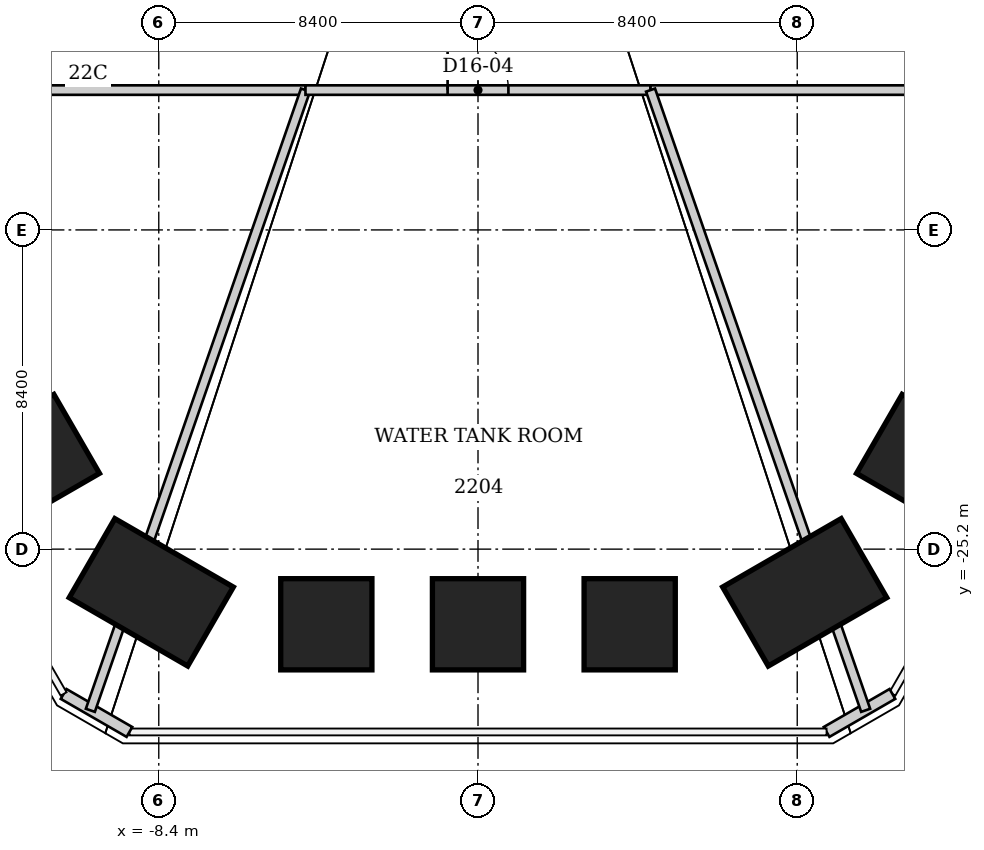
"""IFC4 building model, lengths in metres.
Left out: names, types, materials, properties, quantities, classifications, styles, units other than length and angle.
Written with IfcOpenShell. Run it as: python <this file> out.ifc"""

import sys

from ifc_helpers import new_model, si_unit, direction, frame, frame_2d, origin, origin_2d, place, context, subcontext, project, spatial, rectangle, extrude, element, fill, save


model = new_model("IFC4")
c1 = context("Model", 3, precision=1e-05, world=origin(), true_north=direction((0.0, 1.0)))
c2 = subcontext(c1, "Body", "Model", "MODEL_VIEW")
j1 = project(units=[si_unit("LENGTHUNIT", "METRE"), si_unit("PLANEANGLEUNIT", "RADIAN")], contexts=[c1])
p1 = place(None, origin())
s1 = spatial("IfcSite", under=j1, at=p1, CompositionType="ELEMENT")
p2 = place(p1, origin())
s2 = spatial("IfcBuilding", under=s1, at=p2, CompositionType="ELEMENT")
p3 = place(p2, frame((0.0, 0.0, 91.4)))
s3 = spatial("IfcBuildingStorey", under=s2, at=p3, CompositionType="ELEMENT", Elevation=91.4)
p4 = place(p3, frame((11.6, -22.767, 0.0), z_axis=(-0.019870066199, 0.038961811833, 0.999043121035), x_axis=(0.866070938597, -0.49857445671, 0.036669339169)))
e1 = element("IfcColumn", 1, at=p4, inside=s3, PredefinedType="COLUMN", context=c2, shape_type="SweptSolid", body=[
    extrude(rectangle(XDim=2.4, YDim=2.4, at=origin_2d()), origin(), (0.0, 0.0, 1.0), 5.333),
])
p5 = place(p3, frame((8.597, -26.337, 0.0), z_axis=(-0.01483449182, 0.0454649703, 0.998855782547), x_axis=(0.499741385567, -0.864909959753, 0.046790053124)))
e2 = element("IfcColumn", 2, at=p5, inside=s3, PredefinedType="COLUMN", context=c2, shape_type="SweptSolid", body=[
    extrude(rectangle(XDim=2.4, YDim=3.6, at=origin_2d()), origin(), (0.0, 0.0, 1.0), 5.332),
])
p6 = place(p3, frame((3.991, -27.177, 0.0), z_axis=(-0.006717378223, 0.045879236296, 0.998924407804), x_axis=(-0.000743903255, -0.99894689874, 0.045875266814)))
e3 = element("IfcColumn", 3, at=p6, inside=s3, PredefinedType="COLUMN", context=c2, shape_type="SweptSolid", body=[
    extrude(rectangle(XDim=2.4, YDim=2.4, at=origin_2d()), origin(), (0.0, 0.0, 1.0), 5.343),
])
p7 = place(p3, frame((0.0, -27.178, 0.0), z_axis=(0.0, 0.045902325325, 0.998945932736), x_axis=(0.0, -0.998945932736, 0.045902325325)))
e4 = element("IfcColumn", 4, at=p7, inside=s3, PredefinedType="COLUMN", context=c2, shape_type="SweptSolid", body=[
    extrude(rectangle(XDim=2.4, YDim=2.4, at=origin_2d()), origin(), (0.0, 0.0, 1.0), 5.351),
])
p8 = place(p3, frame((-3.991, -27.177, 0.0), z_axis=(0.006717378223, 0.045879236296, 0.998924407804), x_axis=(0.000743903255, -0.99894689874, 0.045875266814)))
e5 = element("IfcColumn", 5, at=p8, inside=s3, PredefinedType="COLUMN", context=c2, shape_type="SweptSolid", body=[
    extrude(rectangle(XDim=2.4, YDim=2.4, at=origin_2d()), origin(), (0.0, 0.0, 1.0), 5.343),
])
p9 = place(p3, frame((-8.597, -26.337, 0.0), z_axis=(0.01483449182, 0.0454649703, 0.998855782547), x_axis=(-0.499741385567, -0.864909959753, 0.046790053124)))
e6 = element("IfcColumn", 6, at=p9, inside=s3, PredefinedType="COLUMN", context=c2, shape_type="SweptSolid", body=[
    extrude(rectangle(XDim=2.4, YDim=3.6, at=origin_2d()), origin(), (0.0, 0.0, 1.0), 5.332),
])
p10 = place(p3, frame((-11.6, -22.767, 0.0), z_axis=(0.019870066199, 0.038961811833, 0.999043121035), x_axis=(-0.866070938597, -0.49857445671, 0.036669339169)))
e7 = element("IfcColumn", 7, at=p10, inside=s3, PredefinedType="COLUMN", context=c2, shape_type="SweptSolid", body=[
    extrude(rectangle(XDim=2.4, YDim=2.4, at=origin_2d()), origin(), (0.0, 0.0, 1.0), 5.333),
])
for number, where, z_axis, x_axis in (
    (8, (10.904, -29.011, 0.0), (0.0, 0.0, 1.0), (-0.866, -0.5, 0.0)),
    (9, (-9.172, -30.011, 0.0), (0.0, 0.0, 1.0), (-0.866, 0.5, 0.0)),
):
    element("IfcWall", number, at=place(p3, frame(where, z_axis=z_axis, x_axis=x_axis)), inside=s3, PredefinedType="SOLIDWALL", context=c2, shape_type="SweptSolid", body=[
        extrude(rectangle(XDim=2.0, YDim=0.3, at=frame_2d((1.0, 0.0))), origin(), (0.0, 0.0, 1.0), 5.24),
    ])
p11 = place(p3, frame((-11.67, -13.12, 0.0), z_axis=(0.0, 0.0, 1.0), x_axis=(1.0, 0.0, 0.0)))
e10 = element("IfcWall", 10, at=p11, inside=s3, PredefinedType="PARTITIONING", context=c2, shape_type="SweptSolid", body=[
    extrude(rectangle(XDim=7.13, YDim=0.25, at=frame_2d((3.565, 0.0))), origin(), (0.0, 0.0, 1.0), 5.24),
])
p12 = place(p3, frame((-10.2, -29.442, 0.0), z_axis=(0.0, 0.0, 1.0), x_axis=(0.327647844649, 0.944799920563, 0.0)))
e11 = element("IfcWall", 11, at=p12, inside=s3, PredefinedType="PARTITIONING", context=c2, shape_type="SweptSolid", body=[
    extrude(rectangle(XDim=17.275, YDim=0.25, at=frame_2d((8.638, 0.0))), origin(), (0.0, 0.0, 1.0), 5.2),
])
p13 = place(p3, frame((-4.54, -13.12, 0.0), z_axis=(0.0, 0.0, 1.0), x_axis=(1.0, 0.0, 0.0)))
e12 = element("IfcWall", 12, at=p13, inside=s3, PredefinedType="PARTITIONING", context=c2, shape_type="SweptSolid", body=[
    extrude(rectangle(XDim=9.08, YDim=0.25, at=frame_2d((4.54, 0.0))), origin(), (0.0, 0.0, 1.0), 5.24),
])
p14 = place(p13, frame((3.74, 0.0, 0.0)))
e13 = element("IfcOpeningElement", 13, at=p14, cuts=e12, PredefinedType="OPENING", context=c2, shape_type="SweptSolid", body=[
    extrude(rectangle(XDim=1.6, YDim=2.4, at=frame_2d((0.8, 1.2))), frame((0.0, 0.125, 0.0), z_axis=(0.0, -1.0, 0.0), x_axis=(1.0, 0.0, 0.0)), (0.0, 0.0, 1.0), 0.25),
])
p15 = place(p3, frame((4.54, -13.12, 0.0), z_axis=(0.0, 0.0, 1.0), x_axis=(1.0, 0.0, 0.0)))
e14 = element("IfcWall", 14, at=p15, inside=s3, PredefinedType="PARTITIONING", context=c2, shape_type="SweptSolid", body=[
    extrude(rectangle(XDim=7.13, YDim=0.25, at=frame_2d((3.565, 0.0))), origin(), (0.0, 0.0, 1.0), 5.24),
])
p16 = place(p3, frame((10.2, -29.442, 0.0), z_axis=(0.0, 0.0, 1.0), x_axis=(-0.327647844649, 0.944799920563, 0.0)))
e15 = element("IfcWall", 15, at=p16, inside=s3, PredefinedType="PARTITIONING", context=c2, shape_type="SweptSolid", body=[
    extrude(rectangle(XDim=17.275, YDim=0.25, at=frame_2d((8.638, 0.0))), origin(), (0.0, 0.0, 1.0), 5.2),
])
p17 = place(p14, origin())
e16 = element("IfcDoor", 16, at=p17, inside=s3, OperationType="DOUBLE_DOOR_SINGLE_SWING", PredefinedType="DOOR", context=c2, shape_type="SweptSolid", body=[
    extrude(rectangle(XDim=1.6, YDim=2.4, at=frame_2d((0.8, 1.2))), frame((0.0, 0.025, 0.0), z_axis=(0.0, -1.0, 0.0), x_axis=(1.0, 0.0, 0.0)), (0.0, 0.0, 1.0), 0.05),
])
fill(e13, e16)
save(model, sys.argv[1])
